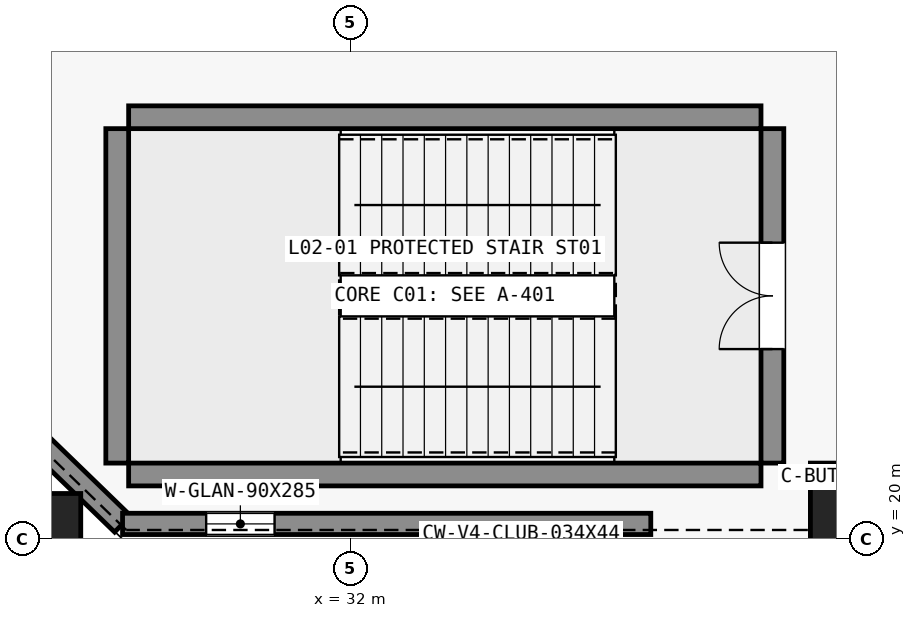
"""IFC4 building model, lengths in metres.
Left out: names, types, materials, properties, quantities, classifications, styles, units other than length and angle.
Written with IfcOpenShell. Run it as: python <this file> out.ifc"""

import sys

from ifc_helpers import new_model, si_unit, direction, frame, frame_2d, origin, origin_2d, place, context, subcontext, project, spatial, rectangle, extrude, element, fill, save


model = new_model("IFC4")
c1 = context("Model", 3, precision=1e-05, world=origin(), true_north=direction((0.0, 1.0)))
c2 = subcontext(c1, "Body", "Model", "MODEL_VIEW")
j1 = project(units=[si_unit("LENGTHUNIT", "METRE"), si_unit("PLANEANGLEUNIT", "RADIAN")], contexts=[c1])
p1 = place(None, origin())
s1 = spatial("IfcSite", under=j1, at=p1, CompositionType="ELEMENT")
p2 = place(p1, origin())
s2 = spatial("IfcBuilding", under=s1, at=p2, CompositionType="ELEMENT")
p3 = place(p2, frame((0.0, 0.0, 11.4)))
s3 = spatial("IfcBuildingStorey", under=s2, at=p3, CompositionType="ELEMENT", Elevation=11.4)
for number, where, z_axis, x_axis in (
    (1, (38.5, 20.4, 0.0), (0.0, 0.0, 1.0), (1.0, 0.0, 0.0)),
    (2, (28.0, 20.0, 0.0), (0.0, 0.0, 1.0), (1.0, 0.0, 0.0)),
):
    element("IfcColumn", number, at=place(p3, frame(where, z_axis=z_axis, x_axis=x_axis)), inside=s3, PredefinedType="PILASTER", context=c2, shape_type="SweptSolid", body=[
        extrude(rectangle(XDim=0.9, YDim=1.2, at=origin_2d()), origin(), (0.0, 0.0, 1.0), 4.8),
    ])
for number, where, z_axis, x_axis in (
    (3, (29.08, 20.85, 0.0), (0.0, 0.0, 1.0), (1.0, 0.0, 0.0)),
    (4, (29.08, 25.55, 0.0), (0.0, 0.0, 1.0), (1.0, 0.0, 0.0)),
):
    element("IfcWall", number, at=place(p3, frame(where, z_axis=z_axis, x_axis=x_axis)), inside=s3, PredefinedType="SHEAR", context=c2, shape_type="SweptSolid", body=[
        extrude(rectangle(XDim=8.32, YDim=0.3, at=frame_2d((4.16, 0.0))), origin(), (0.0, 0.0, 1.0), 4.8),
    ])
p4 = place(p3, frame((28.93, 21.0, 0.0), z_axis=(0.0, 0.0, 1.0), x_axis=(0.0, 1.0, 0.0)))
e5 = element("IfcWall", 5, at=p4, inside=s3, PredefinedType="SHEAR", context=c2, shape_type="SweptSolid", body=[
    extrude(rectangle(XDim=4.4, YDim=0.3, at=frame_2d((2.2, 0.0))), origin(), (0.0, 0.0, 1.0), 4.8),
])
p5 = place(p3, frame((37.55, 21.0, 0.0), z_axis=(0.0, 0.0, 1.0), x_axis=(0.0, 1.0, 0.0)))
e6 = element("IfcWall", 6, at=p5, inside=s3, PredefinedType="SHEAR", context=c2, shape_type="SweptSolid", body=[
    extrude(rectangle(XDim=4.4, YDim=0.3, at=frame_2d((2.2, 0.0))), origin(), (0.0, 0.0, 1.0), 4.8),
])
p6 = place(p5, frame((1.5, 0.0, 0.0)))
e7 = element("IfcOpeningElement", 7, at=p6, cuts=e6, PredefinedType="OPENING", context=c2, shape_type="SweptSolid", body=[
    extrude(rectangle(XDim=1.4, YDim=2.2, at=frame_2d((0.7, 1.1))), frame((0.0, 0.16, 0.0), z_axis=(0.0, -1.0, 0.0), x_axis=(1.0, 0.0, 0.0)), (0.0, 0.0, 1.0), 0.32),
])
p7 = place(p3, frame((16.2, 32.6, 0.0), z_axis=(0.0, 0.0, 1.0), x_axis=(0.718237441527, -0.695798086796, 0.0)))
e8 = element("IfcWall", 8, at=p7, inside=s3, PredefinedType="STANDARD", context=c2, shape_type="SweptSolid", body=[
    extrude(rectangle(XDim=17.822, YDim=0.3, at=frame_2d((8.911, 0.0))), origin(), (0.0, 0.0, 1.0), 3.6),
])
p8 = place(p7, frame((1.1, 0.0, 0.95)))
e9 = element("IfcOpeningElement", 9, at=p8, cuts=e8, PredefinedType="OPENING", context=c2, shape_type="SweptSolid", body=[
    extrude(rectangle(XDim=0.9, YDim=2.3, at=frame_2d((0.45, 1.15))), frame((0.0, 0.16, 0.0), z_axis=(0.0, -1.0, 0.0), x_axis=(1.0, 0.0, 0.0)), (0.0, 0.0, 1.0), 0.32),
])
p9 = place(p7, frame((2.45, 0.0, 0.95)))
e10 = element("IfcOpeningElement", 10, at=p9, cuts=e8, PredefinedType="OPENING", context=c2, shape_type="SweptSolid", body=[
    extrude(rectangle(XDim=0.9, YDim=2.3, at=frame_2d((0.45, 1.15))), frame((0.0, 0.16, 0.0), z_axis=(0.0, -1.0, 0.0), x_axis=(1.0, 0.0, 0.0)), (0.0, 0.0, 1.0), 0.32),
])
p10 = place(p7, frame((4.3, 0.0, 0.95)))
e11 = element("IfcOpeningElement", 11, at=p10, cuts=e8, PredefinedType="OPENING", context=c2, shape_type="SweptSolid", body=[
    extrude(rectangle(XDim=0.9, YDim=2.3, at=frame_2d((0.45, 1.15))), frame((0.0, 0.16, 0.0), z_axis=(0.0, -1.0, 0.0), x_axis=(1.0, 0.0, 0.0)), (0.0, 0.0, 1.0), 0.32),
])
p11 = place(p7, frame((5.65, 0.0, 0.95)))
e12 = element("IfcOpeningElement", 12, at=p11, cuts=e8, PredefinedType="OPENING", context=c2, shape_type="SweptSolid", body=[
    extrude(rectangle(XDim=0.9, YDim=2.3, at=frame_2d((0.45, 1.15))), frame((0.0, 0.16, 0.0), z_axis=(0.0, -1.0, 0.0), x_axis=(1.0, 0.0, 0.0)), (0.0, 0.0, 1.0), 0.32),
])
p12 = place(p7, frame((7.5, 0.0, 0.95)))
e13 = element("IfcOpeningElement", 13, at=p12, cuts=e8, PredefinedType="OPENING", context=c2, shape_type="SweptSolid", body=[
    extrude(rectangle(XDim=0.9, YDim=2.3, at=frame_2d((0.45, 1.15))), frame((0.0, 0.16, 0.0), z_axis=(0.0, -1.0, 0.0), x_axis=(1.0, 0.0, 0.0)), (0.0, 0.0, 1.0), 0.32),
])
p13 = place(p7, frame((8.85, 0.0, 0.95)))
e14 = element("IfcOpeningElement", 14, at=p13, cuts=e8, PredefinedType="OPENING", context=c2, shape_type="SweptSolid", body=[
    extrude(rectangle(XDim=0.9, YDim=2.3, at=frame_2d((0.45, 1.15))), frame((0.0, 0.16, 0.0), z_axis=(0.0, -1.0, 0.0), x_axis=(1.0, 0.0, 0.0)), (0.0, 0.0, 1.0), 0.32),
])
p14 = place(p7, frame((10.7, 0.0, 0.95)))
e15 = element("IfcOpeningElement", 15, at=p14, cuts=e8, PredefinedType="OPENING", context=c2, shape_type="SweptSolid", body=[
    extrude(rectangle(XDim=0.9, YDim=2.3, at=frame_2d((0.45, 1.15))), frame((0.0, 0.16, 0.0), z_axis=(0.0, -1.0, 0.0), x_axis=(1.0, 0.0, 0.0)), (0.0, 0.0, 1.0), 0.32),
])
p15 = place(p7, frame((12.05, 0.0, 0.95)))
e16 = element("IfcOpeningElement", 16, at=p15, cuts=e8, PredefinedType="OPENING", context=c2, shape_type="SweptSolid", body=[
    extrude(rectangle(XDim=0.9, YDim=2.3, at=frame_2d((0.45, 1.15))), frame((0.0, 0.16, 0.0), z_axis=(0.0, -1.0, 0.0), x_axis=(1.0, 0.0, 0.0)), (0.0, 0.0, 1.0), 0.32),
])
p16 = place(p7, frame((13.9, 0.0, 0.95)))
e17 = element("IfcOpeningElement", 17, at=p16, cuts=e8, PredefinedType="OPENING", context=c2, shape_type="SweptSolid", body=[
    extrude(rectangle(XDim=0.9, YDim=2.3, at=frame_2d((0.45, 1.15))), frame((0.0, 0.16, 0.0), z_axis=(0.0, -1.0, 0.0), x_axis=(1.0, 0.0, 0.0)), (0.0, 0.0, 1.0), 0.32),
])
p17 = place(p7, frame((15.25, 0.0, 0.95)))
e18 = element("IfcOpeningElement", 18, at=p17, cuts=e8, PredefinedType="OPENING", context=c2, shape_type="SweptSolid", body=[
    extrude(rectangle(XDim=0.9, YDim=2.3, at=frame_2d((0.45, 1.15))), frame((0.0, 0.16, 0.0), z_axis=(0.0, -1.0, 0.0), x_axis=(1.0, 0.0, 0.0)), (0.0, 0.0, 1.0), 0.32),
])
p18 = place(p3, frame((29.0, 20.2, 0.0), z_axis=(0.0, 0.0, 1.0), x_axis=(1.0, 0.0, 0.0)))
e19 = element("IfcWall", 19, at=p18, inside=s3, PredefinedType="STANDARD", context=c2, shape_type="SweptSolid", body=[
    extrude(rectangle(XDim=6.95, YDim=0.28, at=frame_2d((3.475, 0.0))), origin(), (0.0, 0.0, 1.0), 4.45),
])
p19 = place(p18, frame((1.1, 0.0, 0.95)))
e20 = element("IfcOpeningElement", 20, at=p19, cuts=e19, PredefinedType="OPENING", context=c2, shape_type="SweptSolid", body=[
    extrude(rectangle(XDim=0.9, YDim=2.85, at=frame_2d((0.45, 1.425))), frame((0.0, 0.15, 0.0), z_axis=(0.0, -1.0, 0.0), x_axis=(1.0, 0.0, 0.0)), (0.0, 0.0, 1.0), 0.3),
])
p20 = place(p19, origin())
e21 = element("IfcWindow", 21, at=p20, inside=s3, PartitioningType="DOUBLE_PANEL_VERTICAL", PredefinedType="WINDOW", context=c2, shape_type="SweptSolid", body=[
    extrude(rectangle(XDim=0.9, YDim=2.85, at=frame_2d((0.45, 1.425))), frame((0.0, 0.03, 0.0), z_axis=(0.0, -1.0, 0.0), x_axis=(1.0, 0.0, 0.0)), (0.0, 0.0, 1.0), 0.06),
])
fill(e20, e21)
p21 = place(p6, origin())
e22 = element("IfcDoor", 22, at=p21, inside=s3, OperationType="DOUBLE_DOOR_SINGLE_SWING", PredefinedType="DOOR", context=c2, shape_type="SweptSolid", body=[
    extrude(rectangle(XDim=1.4, YDim=2.2, at=frame_2d((0.7, 1.1))), frame((0.0, 0.025, 0.0), z_axis=(0.0, -1.0, 0.0), x_axis=(1.0, 0.0, 0.0)), (0.0, 0.0, 1.0), 0.05),
])
fill(e7, e22)
save(model, sys.argv[1])
